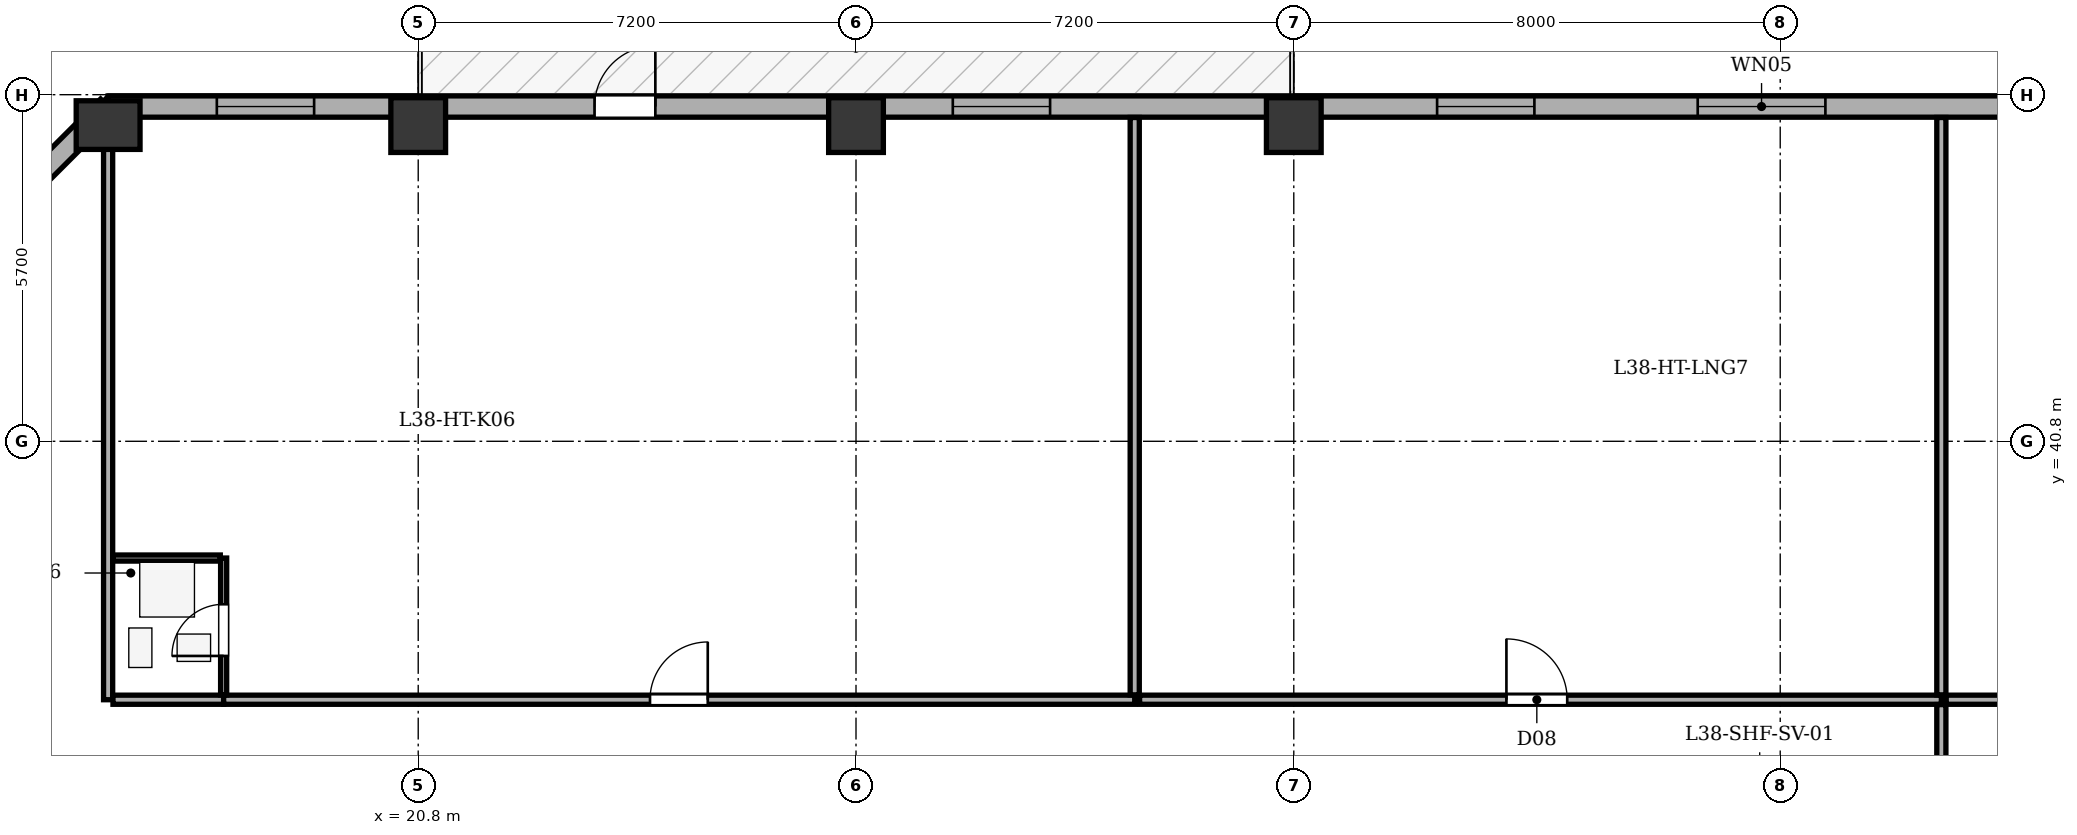
"""IFC4 building model, lengths in metres.
Left out: names, types, materials, properties, quantities, classifications, styles, units other than length and angle.
Written with IfcOpenShell. Run it as: python <this file> out.ifc"""

import sys

from ifc_helpers import new_model, si_unit, direction, frame, frame_2d, origin, origin_2d, place, context, subcontext, project, spatial, rectangle, extrude, element, fill, save


model = new_model("IFC4")
c1 = context("Model", 3, precision=1e-05, world=origin(), true_north=direction((0.0, 1.0)))
c2 = subcontext(c1, "Body", "Model", "MODEL_VIEW")
j1 = project(units=[si_unit("LENGTHUNIT", "METRE"), si_unit("PLANEANGLEUNIT", "RADIAN")], contexts=[c1])
p1 = place(None, origin())
s1 = spatial("IfcSite", under=j1, at=p1, CompositionType="ELEMENT")
p2 = place(p1, origin())
s2 = spatial("IfcBuilding", under=s1, at=p2, CompositionType="ELEMENT")
p3 = place(p2, frame((0.0, 0.0, 151.8)))
s3 = spatial("IfcBuildingStorey", under=s2, at=p3, CompositionType="ELEMENT", Elevation=151.8)
p4 = place(p3, frame((15.7, 46.0, 0.0), z_axis=(0.0, 0.0, 1.0), x_axis=(1.0, 0.0, 0.0)))
e1 = element("IfcColumn", 1, at=p4, inside=s3, PredefinedType="COLUMN", context=c2, shape_type="SweptSolid", body=[
    extrude(rectangle(XDim=0.8, YDim=1.05, at=origin_2d()), origin(), (0.0, 0.0, 1.0), 3.5),
])
for number, where, z_axis, x_axis in (
    (2, (20.8, 46.0, 0.0), (0.0, 0.0, 1.0), (1.0, 0.0, 0.0)),
    (3, (28.0, 46.0, 0.0), (0.0, 0.0, 1.0), (1.0, 0.0, 0.0)),
    (4, (35.2, 46.0, 0.0), (0.0, 0.0, 1.0), (1.0, 0.0, 0.0)),
):
    element("IfcColumn", number, at=place(p3, frame(where, z_axis=z_axis, x_axis=x_axis)), inside=s3, PredefinedType="COLUMN", context=c2, shape_type="SweptSolid", body=[
        extrude(rectangle(XDim=0.9, YDim=0.9, at=origin_2d()), origin(), (0.0, 0.0, 1.0), 3.5),
    ])
p5 = place(p3, frame((10.895, 41.5, 0.0), z_axis=(0.0, 0.0, 1.0), x_axis=(0.707106781187, 0.707106781187, 0.0)))
e5 = element("IfcWall", 5, at=p5, inside=s3, PredefinedType="STANDARD", context=c2, shape_type="SweptSolid", body=[
    extrude(rectangle(XDim=6.795, YDim=0.35, at=frame_2d((3.397, 0.0))), origin(), (0.0, 0.0, 1.0), 2.785),
])
p6 = place(p5, frame((2.698, 0.0, 0.75)))
e6 = element("IfcOpeningElement", 6, at=p6, cuts=e5, PredefinedType="OPENING", context=c2, shape_type="SweptSolid", body=[
    extrude(rectangle(XDim=1.4, YDim=1.65, at=frame_2d((0.7, 0.825))), frame((0.0, 0.185, 0.0), z_axis=(0.0, -1.0, 0.0), x_axis=(1.0, 0.0, 0.0)), (0.0, 0.0, 1.0), 0.37),
])
p7 = place(p3, frame((15.7, 46.305, 0.0), z_axis=(0.0, 0.0, 1.0), x_axis=(1.0, 0.0, 0.0)))
e7 = element("IfcWall", 7, at=p7, inside=s3, PredefinedType="STANDARD", context=c2, shape_type="SweptSolid", body=[
    extrude(rectangle(XDim=35.0, YDim=0.35, at=frame_2d((17.5, 0.0))), origin(), (0.0, 0.0, 1.0), 2.785),
])
p8 = place(p7, frame((8.0, 0.0, 0.0)))
e8 = element("IfcOpeningElement", 8, at=p8, cuts=e7, PredefinedType="OPENING", context=c2, shape_type="SweptSolid", body=[
    extrude(rectangle(XDim=1.0, YDim=2.02, at=frame_2d((0.5, 1.01))), frame((0.0, 0.185, 0.0), z_axis=(0.0, -1.0, 0.0), x_axis=(1.0, 0.0, 0.0)), (0.0, 0.0, 1.0), 0.37),
])
p9 = place(p7, frame((1.788, 0.0, 0.75)))
e9 = element("IfcOpeningElement", 9, at=p9, cuts=e7, PredefinedType="OPENING", context=c2, shape_type="SweptSolid", body=[
    extrude(rectangle(XDim=1.6, YDim=1.75, at=frame_2d((0.8, 0.875))), frame((0.0, 0.185, 0.0), z_axis=(0.0, -1.0, 0.0), x_axis=(1.0, 0.0, 0.0)), (0.0, 0.0, 1.0), 0.37),
])
p10 = place(p7, frame((13.892, 0.0, 0.75)))
e10 = element("IfcOpeningElement", 10, at=p10, cuts=e7, PredefinedType="OPENING", context=c2, shape_type="SweptSolid", body=[
    extrude(rectangle(XDim=1.6, YDim=1.75, at=frame_2d((0.8, 0.875))), frame((0.0, 0.185, 0.0), z_axis=(0.0, -1.0, 0.0), x_axis=(1.0, 0.0, 0.0)), (0.0, 0.0, 1.0), 0.37),
])
p11 = place(p7, frame((21.857, 0.0, 0.75)))
e11 = element("IfcOpeningElement", 11, at=p11, cuts=e7, PredefinedType="OPENING", context=c2, shape_type="SweptSolid", body=[
    extrude(rectangle(XDim=1.6, YDim=1.75, at=frame_2d((0.8, 0.875))), frame((0.0, 0.185, 0.0), z_axis=(0.0, -1.0, 0.0), x_axis=(1.0, 0.0, 0.0)), (0.0, 0.0, 1.0), 0.37),
])
p12 = place(p7, frame((26.143, 0.0, 0.75)))
e12 = element("IfcOpeningElement", 12, at=p12, cuts=e7, PredefinedType="OPENING", context=c2, shape_type="SweptSolid", body=[
    extrude(rectangle(XDim=2.1, YDim=1.75, at=frame_2d((1.05, 0.875))), frame((0.0, 0.185, 0.0), z_axis=(0.0, -1.0, 0.0), x_axis=(1.0, 0.0, 0.0)), (0.0, 0.0, 1.0), 0.37),
])
p13 = place(p7, frame((31.637, 0.0, 0.75)))
e13 = element("IfcOpeningElement", 13, at=p13, cuts=e7, PredefinedType="OPENING", context=c2, shape_type="SweptSolid", body=[
    extrude(rectangle(XDim=1.6, YDim=1.75, at=frame_2d((0.8, 0.875))), frame((0.0, 0.185, 0.0), z_axis=(0.0, -1.0, 0.0), x_axis=(1.0, 0.0, 0.0)), (0.0, 0.0, 1.0), 0.37),
])
p14 = place(p3, frame((15.7, 36.55, 0.0), z_axis=(0.0, 0.0, 1.0), x_axis=(0.0, 1.0, 0.0)))
e14 = element("IfcWall", 14, at=p14, inside=s3, PredefinedType="PARTITIONING", context=c2, shape_type="SweptSolid", body=[
    extrude(rectangle(XDim=9.575, YDim=0.15, at=frame_2d((4.788, 0.0))), origin(), (0.0, 0.0, 1.0), 3.2),
])
p15 = place(p3, frame((15.78, 36.55, 0.0), z_axis=(0.0, 0.0, 1.0), x_axis=(1.0, 0.0, 0.0)))
e15 = element("IfcWall", 15, at=p15, inside=s3, PredefinedType="PARTITIONING", context=c2, shape_type="SweptSolid", body=[
    extrude(rectangle(XDim=1.82, YDim=0.15, at=frame_2d((0.91, 0.0))), origin(), (0.0, 0.0, 1.0), 3.2),
])
p16 = place(p3, frame((17.6, 36.55, 0.0), z_axis=(0.0, 0.0, 1.0), x_axis=(1.0, 0.0, 0.0)))
e16 = element("IfcWall", 16, at=p16, inside=s3, PredefinedType="PARTITIONING", context=c2, shape_type="SweptSolid", body=[
    extrude(rectangle(XDim=14.984, YDim=0.15, at=frame_2d((7.492, 0.0))), origin(), (0.0, 0.0, 1.0), 3.2),
])
p17 = place(p16, frame((7.012, 0.0, 0.0)))
e17 = element("IfcOpeningElement", 17, at=p17, cuts=e16, PredefinedType="OPENING", context=c2, shape_type="SweptSolid", body=[
    extrude(rectangle(XDim=0.95, YDim=2.1, at=frame_2d((0.475, 1.05))), frame((0.0, 0.085, 0.0), z_axis=(0.0, -1.0, 0.0), x_axis=(1.0, 0.0, 0.0)), (0.0, 0.0, 1.0), 0.17),
])
p18 = place(p3, frame((17.6, 36.63, 0.0), z_axis=(0.0, 0.0, 1.0), x_axis=(0.0, 1.0, 0.0)))
e18 = element("IfcWall", 18, at=p18, inside=s3, PredefinedType="PARTITIONING", context=c2, shape_type="SweptSolid", body=[
    extrude(rectangle(XDim=2.25, YDim=0.1, at=frame_2d((1.125, 0.0))), origin(), (0.0, 0.0, 1.0), 3.2),
])
p19 = place(p18, frame((0.64, 0.0, 0.0)))
e19 = element("IfcOpeningElement", 19, at=p19, cuts=e18, PredefinedType="OPENING", context=c2, shape_type="SweptSolid", body=[
    extrude(rectangle(XDim=0.85, YDim=2.05, at=frame_2d((0.425, 1.025))), frame((0.0, 0.06, 0.0), z_axis=(0.0, -1.0, 0.0), x_axis=(1.0, 0.0, 0.0)), (0.0, 0.0, 1.0), 0.12),
])
p20 = place(p3, frame((15.78, 38.88, 0.0), z_axis=(0.0, 0.0, 1.0), x_axis=(1.0, 0.0, 0.0)))
e20 = element("IfcWall", 20, at=p20, inside=s3, PredefinedType="PARTITIONING", context=c2, shape_type="SweptSolid", body=[
    extrude(rectangle(XDim=1.765, YDim=0.1, at=frame_2d((0.882, 0.0))), origin(), (0.0, 0.0, 1.0), 3.2),
])
p21 = place(p3, frame((32.584, 36.63, 0.0), z_axis=(0.0, 0.0, 1.0), x_axis=(0.0, 1.0, 0.0)))
e21 = element("IfcWall", 21, at=p21, inside=s3, PredefinedType="PARTITIONING", context=c2, shape_type="SweptSolid", body=[
    extrude(rectangle(XDim=9.495, YDim=0.15, at=frame_2d((4.748, 0.0))), origin(), (0.0, 0.0, 1.0), 3.2),
])
p22 = place(p3, frame((32.664, 36.55, 0.0), z_axis=(0.0, 0.0, 1.0), x_axis=(1.0, 0.0, 0.0)))
e22 = element("IfcWall", 22, at=p22, inside=s3, PredefinedType="PARTITIONING", context=c2, shape_type="SweptSolid", body=[
    extrude(rectangle(XDim=13.186, YDim=0.15, at=frame_2d((6.593, 0.0))), origin(), (0.0, 0.0, 1.0), 3.2),
])
p23 = place(p22, frame((6.033, 0.0, 0.0)))
e23 = element("IfcOpeningElement", 23, at=p23, cuts=e22, PredefinedType="OPENING", context=c2, shape_type="SweptSolid", body=[
    extrude(rectangle(XDim=1.0, YDim=2.1, at=frame_2d((0.5, 1.05))), frame((0.0, 0.085, 0.0), z_axis=(0.0, -1.0, 0.0), x_axis=(1.0, 0.0, 0.0)), (0.0, 0.0, 1.0), 0.17),
])
p24 = place(p3, frame((45.85, 36.63, 0.0), z_axis=(0.0, 0.0, 1.0), x_axis=(0.0, 1.0, 0.0)))
e24 = element("IfcWall", 24, at=p24, inside=s3, PredefinedType="PARTITIONING", context=c2, shape_type="SweptSolid", body=[
    extrude(rectangle(XDim=9.495, YDim=0.15, at=frame_2d((4.748, 0.0))), origin(), (0.0, 0.0, 1.0), 3.2),
])
p25 = place(p3, frame((45.93, 36.55, 0.0), z_axis=(0.0, 0.0, 1.0), x_axis=(1.0, 0.0, 0.0)))
e25 = element("IfcWall", 25, at=p25, inside=s3, PredefinedType="PARTITIONING", context=c2, shape_type="SweptSolid", body=[
    extrude(rectangle(XDim=9.395, YDim=0.15, at=frame_2d((4.698, 0.0))), origin(), (0.0, 0.0, 1.0), 3.2),
])
p26 = place(p3, frame((45.85, 30.28, 0.0), z_axis=(0.0, 0.0, 1.0), x_axis=(0.0, 1.0, 0.0)))
e26 = element("IfcWall", 26, at=p26, inside=s3, PredefinedType="PARTITIONING", context=c2, shape_type="SweptSolid", body=[
    extrude(rectangle(XDim=6.19, YDim=0.15, at=frame_2d((3.095, 0.0))), origin(), (0.0, 0.0, 1.0), 3.2),
])
p27 = place(p26, frame((2.615, 0.0, 0.0)))
e27 = element("IfcOpeningElement", 27, at=p27, cuts=e26, PredefinedType="OPENING", context=c2, shape_type="SweptSolid", body=[
    extrude(rectangle(XDim=0.95, YDim=2.1, at=frame_2d((0.475, 1.05))), frame((0.0, 0.085, 0.0), z_axis=(0.0, -1.0, 0.0), x_axis=(1.0, 0.0, 0.0)), (0.0, 0.0, 1.0), 0.17),
])
p28 = place(p8, origin())
e28 = element("IfcDoor", 28, at=p28, inside=s3, OperationType="SINGLE_SWING_RIGHT", PredefinedType="DOOR", context=c2, shape_type="SweptSolid", body=[
    extrude(rectangle(XDim=1.0, YDim=2.02, at=frame_2d((0.5, 1.01))), frame((0.0, 0.025, 0.0), z_axis=(0.0, -1.0, 0.0), x_axis=(1.0, 0.0, 0.0)), (0.0, 0.0, 1.0), 0.05),
])
fill(e8, e28)
p29 = place(p9, origin())
e29 = element("IfcWindow", 29, at=p29, inside=s3, PartitioningType="SINGLE_PANEL", PredefinedType="WINDOW", context=c2, shape_type="SweptSolid", body=[
    extrude(rectangle(XDim=1.6, YDim=1.75, at=frame_2d((0.8, 0.875))), frame((0.0, -0.01, 0.0), z_axis=(0.0, -1.0, 0.0), x_axis=(1.0, 0.0, 0.0)), (0.0, 0.0, 1.0), 0.06),
])
fill(e9, e29)
p30 = place(p10, origin())
e30 = element("IfcWindow", 30, at=p30, inside=s3, PartitioningType="SINGLE_PANEL", PredefinedType="WINDOW", context=c2, shape_type="SweptSolid", body=[
    extrude(rectangle(XDim=1.6, YDim=1.75, at=frame_2d((0.8, 0.875))), frame((0.0, -0.01, 0.0), z_axis=(0.0, -1.0, 0.0), x_axis=(1.0, 0.0, 0.0)), (0.0, 0.0, 1.0), 0.06),
])
fill(e10, e30)
p31 = place(p11, origin())
e31 = element("IfcWindow", 31, at=p31, inside=s3, PartitioningType="SINGLE_PANEL", PredefinedType="WINDOW", context=c2, shape_type="SweptSolid", body=[
    extrude(rectangle(XDim=1.6, YDim=1.75, at=frame_2d((0.8, 0.875))), frame((0.0, -0.01, 0.0), z_axis=(0.0, -1.0, 0.0), x_axis=(1.0, 0.0, 0.0)), (0.0, 0.0, 1.0), 0.06),
])
fill(e11, e31)
p32 = place(p12, origin())
e32 = element("IfcWindow", 32, at=p32, inside=s3, PartitioningType="SINGLE_PANEL", PredefinedType="WINDOW", context=c2, shape_type="SweptSolid", body=[
    extrude(rectangle(XDim=2.1, YDim=1.75, at=frame_2d((1.05, 0.875))), frame((0.0, -0.01, 0.0), z_axis=(0.0, -1.0, 0.0), x_axis=(1.0, 0.0, 0.0)), (0.0, 0.0, 1.0), 0.06),
])
fill(e12, e32)
p33 = place(p19, origin())
e33 = element("IfcDoor", 33, at=p33, inside=s3, OperationType="SINGLE_SWING_LEFT", PredefinedType="DOOR", context=c2, shape_type="SweptSolid", body=[
    extrude(rectangle(XDim=0.85, YDim=2.05, at=frame_2d((0.425, 1.025))), frame((0.0, 0.025, 0.0), z_axis=(0.0, -1.0, 0.0), x_axis=(1.0, 0.0, 0.0)), (0.0, 0.0, 1.0), 0.05),
])
fill(e19, e33)
p34 = place(p17, origin())
e34 = element("IfcDoor", 34, at=p34, inside=s3, OperationType="SINGLE_SWING_RIGHT", PredefinedType="DOOR", context=c2, shape_type="SweptSolid", body=[
    extrude(rectangle(XDim=0.95, YDim=2.1, at=frame_2d((0.475, 1.05))), frame((0.0, 0.025, 0.0), z_axis=(0.0, -1.0, 0.0), x_axis=(1.0, 0.0, 0.0)), (0.0, 0.0, 1.0), 0.05),
])
fill(e17, e34)
p35 = place(p23, origin())
e35 = element("IfcDoor", 35, at=p35, inside=s3, OperationType="SINGLE_SWING_LEFT", PredefinedType="DOOR", context=c2, shape_type="SweptSolid", body=[
    extrude(rectangle(XDim=1.0, YDim=2.1, at=frame_2d((0.5, 1.05))), frame((0.0, 0.025, 0.0), z_axis=(0.0, -1.0, 0.0), x_axis=(1.0, 0.0, 0.0)), (0.0, 0.0, 1.0), 0.05),
])
fill(e23, e35)
save(model, sys.argv[1])
